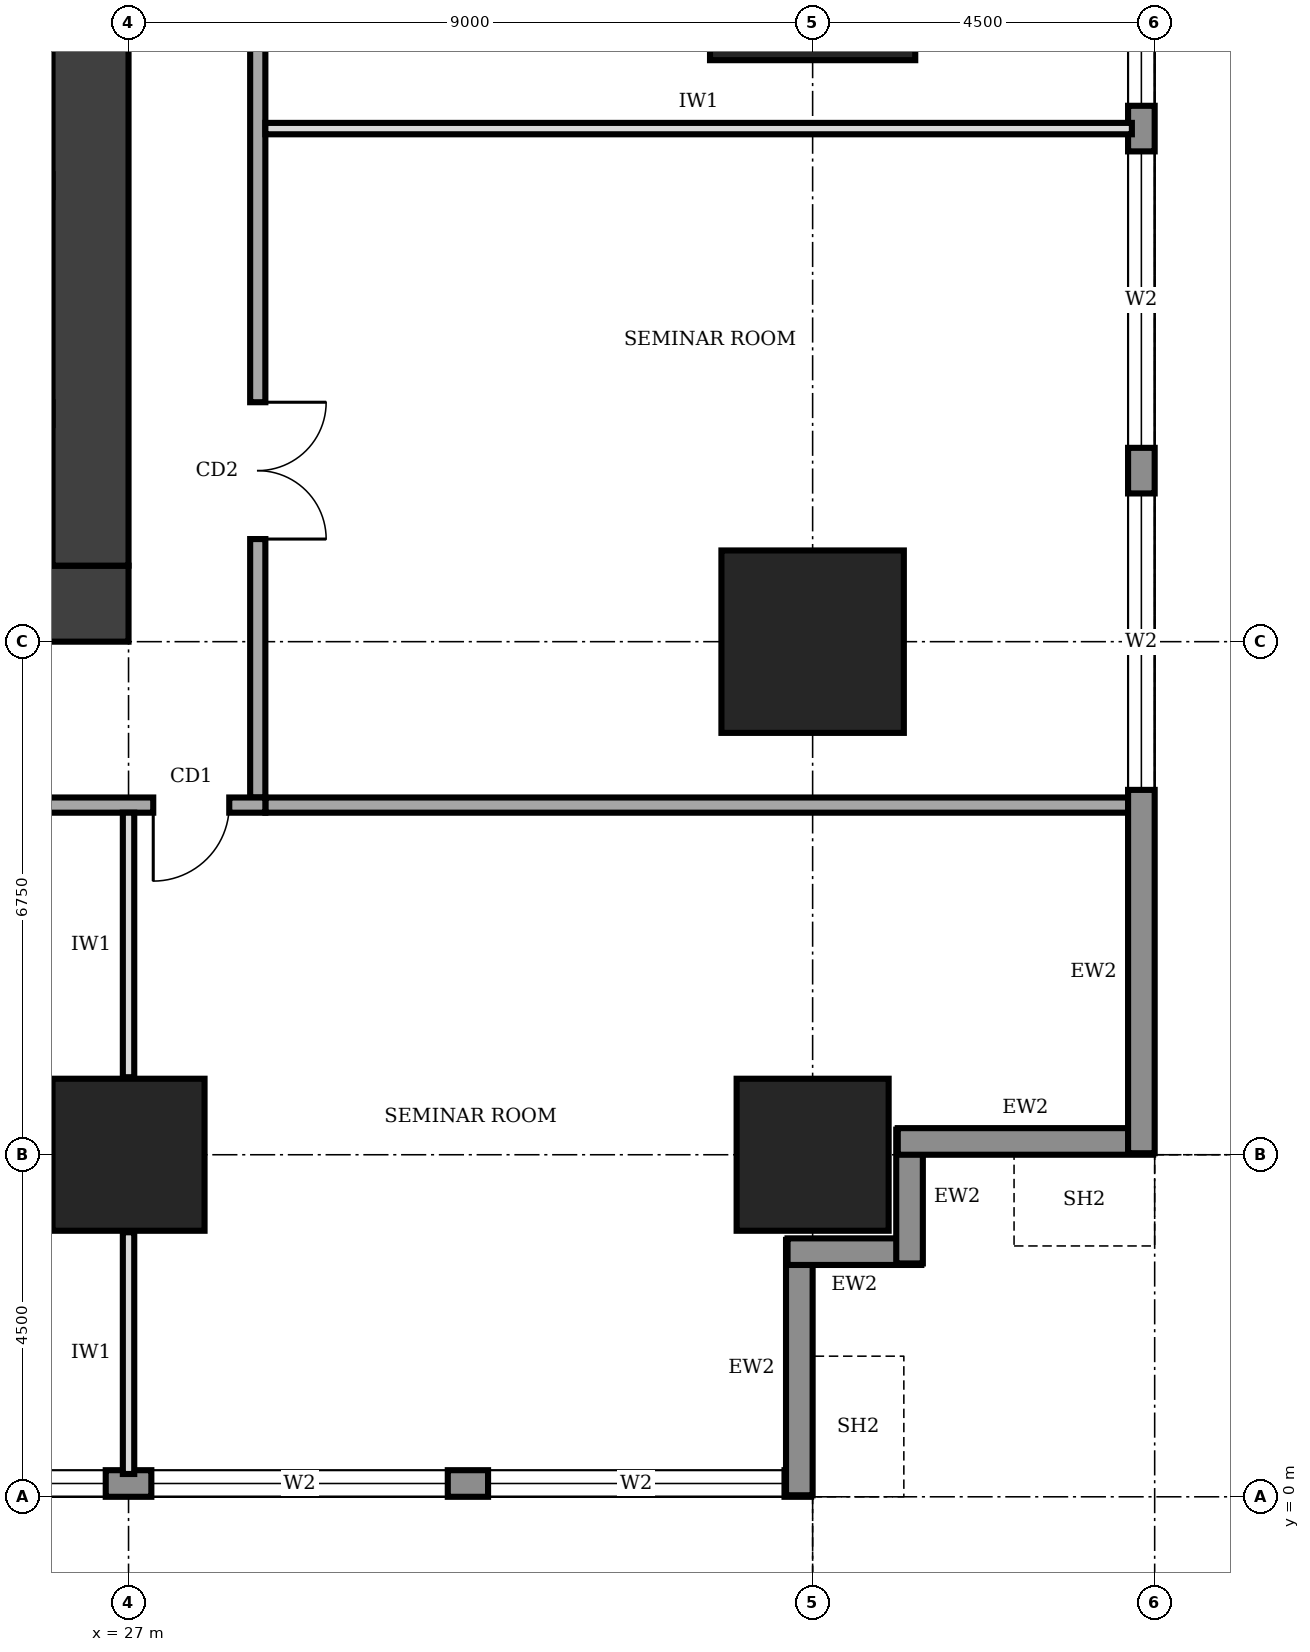
"""IFC4 building model, lengths in metres.
Left out: names, types, materials, properties, quantities, classifications, styles, units other than length and angle.
Written with IfcOpenShell. Run it as: python <this file> out.ifc"""

import sys

from ifc_helpers import new_model, si_unit, direction, frame, frame_2d, origin, origin_2d, place, context, subcontext, project, spatial, rectangle, extrude, element, fill, save


model = new_model("IFC4")
c1 = context("Model", 3, precision=1e-05, world=origin(), true_north=direction((0.0, 1.0)))
c2 = subcontext(c1, "Body", "Model", "MODEL_VIEW")
j1 = project(units=[si_unit("LENGTHUNIT", "METRE"), si_unit("PLANEANGLEUNIT", "RADIAN")], contexts=[c1])
p1 = place(None, origin())
s1 = spatial("IfcSite", under=j1, at=p1, CompositionType="ELEMENT")
p2 = place(p1, origin())
s2 = spatial("IfcBuilding", under=s1, at=p2, CompositionType="ELEMENT")
p3 = place(p2, frame((0.0, 0.0, 57.0)))
s3 = spatial("IfcBuildingStorey", under=s2, at=p3, CompositionType="ELEMENT", Elevation=57.0)
p4 = place(p3, frame((13.5, 11.75, 0.0), z_axis=(0.0, 0.0, 1.0), x_axis=(1.0, 0.0, 0.0)))
e1 = element("IfcWall", 1, at=p4, inside=s3, PredefinedType="SHEAR", context=c2, shape_type="SweptSolid", body=[
    extrude(rectangle(XDim=13.5, YDim=1.0, at=frame_2d((6.75, 0.0))), origin(), (0.0, 0.0, 1.0), 4.0),
])
p5 = place(p4, frame((4.75, 0.0, 0.0)))
e2 = element("IfcOpeningElement", 2, at=p5, cuts=e1, PredefinedType="OPENING", context=c2, shape_type="SweptSolid", body=[
    extrude(rectangle(XDim=1.0, YDim=2.1, at=frame_2d((0.5, 1.05))), frame((0.0, 0.51, 0.0), z_axis=(0.0, -1.0, 0.0), x_axis=(1.0, 0.0, 0.0)), (0.0, 0.0, 1.0), 1.02),
])
p6 = place(p3, frame((26.5, 12.25, 0.0), z_axis=(0.0, 0.0, 1.0), x_axis=(0.0, 1.0, 0.0)))
e3 = element("IfcWall", 3, at=p6, inside=s3, PredefinedType="SHEAR", context=c2, shape_type="SweptSolid", body=[
    extrude(rectangle(XDim=16.0, YDim=1.0, at=frame_2d((8.0, 0.0))), origin(), (0.0, 0.0, 1.0), 4.0),
])
for number, where, z_axis, x_axis in (
    (4, (27.0, 4.5, 0.0), (0.0, 0.0, 1.0), (1.0, 0.0, 0.0)),
    (5, (36.0, 4.5, 0.0), (0.0, 0.0, 1.0), (1.0, 0.0, 0.0)),
):
    element("IfcColumn", number, at=place(p3, frame(where, z_axis=z_axis, x_axis=x_axis)), inside=s3, PredefinedType="COLUMN", context=c2, shape_type="SweptSolid", body=[
        extrude(rectangle(XDim=2.0, YDim=2.0, at=origin_2d()), origin(), (0.0, 0.0, 1.0), 4.0),
    ])
p7 = place(p3, frame((36.0, 11.25, 0.0), z_axis=(0.0, 0.0, 1.0), x_axis=(1.0, 0.0, 0.0)))
e6 = element("IfcColumn", 6, at=p7, inside=s3, PredefinedType="COLUMN", context=c2, shape_type="SweptSolid", body=[
    extrude(rectangle(XDim=2.4, YDim=2.4, at=origin_2d()), origin(), (0.0, 0.0, 1.0), 4.0),
])
p8 = place(p3, frame((36.0, 20.25, 0.0), z_axis=(0.0, 0.0, 1.0), x_axis=(1.0, 0.0, 0.0)))
e7 = element("IfcColumn", 7, at=p8, inside=s3, PredefinedType="COLUMN", context=c2, shape_type="SweptSolid", body=[
    extrude(rectangle(XDim=2.7, YDim=2.7, at=origin_2d()), origin(), (0.0, 0.0, 1.0), 4.0),
])
p9 = place(p3, frame((4.52, 0.175, 0.0), z_axis=(0.0, 0.0, 1.0), x_axis=(1.0, 0.0, 0.0)))
e8 = element("IfcWall", 8, at=p9, inside=s3, PredefinedType="STANDARD", context=c2, shape_type="SweptSolid", body=[
    extrude(rectangle(XDim=31.46, YDim=0.35, at=frame_2d((15.73, 0.0))), origin(), (0.0, 0.0, 1.0), 3.75),
])
p10 = place(p9, frame((4.78, 0.0, 0.6)))
e9 = element("IfcOpeningElement", 9, at=p10, cuts=e8, PredefinedType="OPENING", context=c2, shape_type="SweptSolid", body=[
    extrude(rectangle(XDim=3.9, YDim=2.6, at=frame_2d((1.95, 1.3))), frame((0.0, 0.185, 0.0), z_axis=(0.0, -1.0, 0.0), x_axis=(1.0, 0.0, 0.0)), (0.0, 0.0, 1.0), 0.37),
])
p11 = place(p9, frame((9.28, 0.0, 0.6)))
e10 = element("IfcOpeningElement", 10, at=p11, cuts=e8, PredefinedType="OPENING", context=c2, shape_type="SweptSolid", body=[
    extrude(rectangle(XDim=3.9, YDim=2.6, at=frame_2d((1.95, 1.3))), frame((0.0, 0.185, 0.0), z_axis=(0.0, -1.0, 0.0), x_axis=(1.0, 0.0, 0.0)), (0.0, 0.0, 1.0), 0.37),
])
p12 = place(p9, frame((13.78, 0.0, 0.6)))
e11 = element("IfcOpeningElement", 11, at=p12, cuts=e8, PredefinedType="OPENING", context=c2, shape_type="SweptSolid", body=[
    extrude(rectangle(XDim=3.9, YDim=2.6, at=frame_2d((1.95, 1.3))), frame((0.0, 0.185, 0.0), z_axis=(0.0, -1.0, 0.0), x_axis=(1.0, 0.0, 0.0)), (0.0, 0.0, 1.0), 0.37),
])
p13 = place(p9, frame((18.28, 0.0, 0.6)))
e12 = element("IfcOpeningElement", 12, at=p13, cuts=e8, PredefinedType="OPENING", context=c2, shape_type="SweptSolid", body=[
    extrude(rectangle(XDim=3.9, YDim=2.6, at=frame_2d((1.95, 1.3))), frame((0.0, 0.185, 0.0), z_axis=(0.0, -1.0, 0.0), x_axis=(1.0, 0.0, 0.0)), (0.0, 0.0, 1.0), 0.37),
])
p14 = place(p9, frame((22.78, 0.0, 0.6)))
e13 = element("IfcOpeningElement", 13, at=p14, cuts=e8, PredefinedType="OPENING", context=c2, shape_type="SweptSolid", body=[
    extrude(rectangle(XDim=3.9, YDim=2.6, at=frame_2d((1.95, 1.3))), frame((0.0, 0.185, 0.0), z_axis=(0.0, -1.0, 0.0), x_axis=(1.0, 0.0, 0.0)), (0.0, 0.0, 1.0), 0.37),
])
p15 = place(p9, frame((27.21, 0.0, 0.6)))
e14 = element("IfcOpeningElement", 14, at=p15, cuts=e8, PredefinedType="OPENING", context=c2, shape_type="SweptSolid", body=[
    extrude(rectangle(XDim=3.9, YDim=2.6, at=frame_2d((1.95, 1.3))), frame((0.0, 0.185, 0.0), z_axis=(0.0, -1.0, 0.0), x_axis=(1.0, 0.0, 0.0)), (0.0, 0.0, 1.0), 0.37),
])
p16 = place(p3, frame((35.825, 0.02, 0.0), z_axis=(0.0, 0.0, 1.0), x_axis=(0.0, 1.0, 0.0)))
e15 = element("IfcWall", 15, at=p16, inside=s3, PredefinedType="STANDARD", context=c2, shape_type="SweptSolid", body=[
    extrude(rectangle(XDim=3.36, YDim=0.35, at=frame_2d((1.68, 0.0))), origin(), (0.0, 0.0, 1.0), 2.85),
])
for number, where, z_axis, x_axis in (
    (16, (35.67, 3.225, 0.0), (0.0, 0.0, 1.0), (1.0, 0.0, 0.0)),
    (17, (37.275, 3.07, 0.0), (0.0, 0.0, 1.0), (0.0, 1.0, 0.0)),
):
    element("IfcWall", number, at=place(p3, frame(where, z_axis=z_axis, x_axis=x_axis)), inside=s3, PredefinedType="STANDARD", context=c2, shape_type="SweptSolid", body=[
        extrude(rectangle(XDim=1.76, YDim=0.35, at=frame_2d((0.88, 0.0))), origin(), (0.0, 0.0, 1.0), 3.75),
    ])
p17 = place(p3, frame((37.12, 4.675, 0.0), z_axis=(0.0, 0.0, 1.0), x_axis=(1.0, 0.0, 0.0)))
e18 = element("IfcWall", 18, at=p17, inside=s3, PredefinedType="STANDARD", context=c2, shape_type="SweptSolid", body=[
    extrude(rectangle(XDim=3.36, YDim=0.35, at=frame_2d((1.68, 0.0))), origin(), (0.0, 0.0, 1.0), 2.85),
])
p18 = place(p3, frame((40.325, 4.52, 0.0), z_axis=(0.0, 0.0, 1.0), x_axis=(0.0, 1.0, 0.0)))
e19 = element("IfcWall", 19, at=p18, inside=s3, PredefinedType="STANDARD", context=c2, shape_type="SweptSolid", body=[
    extrude(rectangle(XDim=31.46, YDim=0.35, at=frame_2d((15.73, 0.0))), origin(), (0.0, 0.0, 1.0), 3.75),
])
p19 = place(p18, frame((4.78, 0.0, 0.6)))
e20 = element("IfcOpeningElement", 20, at=p19, cuts=e19, PredefinedType="OPENING", context=c2, shape_type="SweptSolid", body=[
    extrude(rectangle(XDim=3.9, YDim=2.6, at=frame_2d((1.95, 1.3))), frame((0.0, 0.185, 0.0), z_axis=(0.0, -1.0, 0.0), x_axis=(1.0, 0.0, 0.0)), (0.0, 0.0, 1.0), 0.37),
])
p20 = place(p18, frame((9.28, 0.0, 0.6)))
e21 = element("IfcOpeningElement", 21, at=p20, cuts=e19, PredefinedType="OPENING", context=c2, shape_type="SweptSolid", body=[
    extrude(rectangle(XDim=3.9, YDim=2.6, at=frame_2d((1.95, 1.3))), frame((0.0, 0.185, 0.0), z_axis=(0.0, -1.0, 0.0), x_axis=(1.0, 0.0, 0.0)), (0.0, 0.0, 1.0), 0.37),
])
p21 = place(p18, frame((13.78, 0.0, 0.6)))
e22 = element("IfcOpeningElement", 22, at=p21, cuts=e19, PredefinedType="OPENING", context=c2, shape_type="SweptSolid", body=[
    extrude(rectangle(XDim=3.9, YDim=2.6, at=frame_2d((1.95, 1.3))), frame((0.0, 0.185, 0.0), z_axis=(0.0, -1.0, 0.0), x_axis=(1.0, 0.0, 0.0)), (0.0, 0.0, 1.0), 0.37),
])
p22 = place(p18, frame((18.28, 0.0, 0.6)))
e23 = element("IfcOpeningElement", 23, at=p22, cuts=e19, PredefinedType="OPENING", context=c2, shape_type="SweptSolid", body=[
    extrude(rectangle(XDim=3.9, YDim=2.6, at=frame_2d((1.95, 1.3))), frame((0.0, 0.185, 0.0), z_axis=(0.0, -1.0, 0.0), x_axis=(1.0, 0.0, 0.0)), (0.0, 0.0, 1.0), 0.37),
])
p23 = place(p18, frame((22.78, 0.0, 0.6)))
e24 = element("IfcOpeningElement", 24, at=p23, cuts=e19, PredefinedType="OPENING", context=c2, shape_type="SweptSolid", body=[
    extrude(rectangle(XDim=3.9, YDim=2.6, at=frame_2d((1.95, 1.3))), frame((0.0, 0.185, 0.0), z_axis=(0.0, -1.0, 0.0), x_axis=(1.0, 0.0, 0.0)), (0.0, 0.0, 1.0), 0.37),
])
p24 = place(p18, frame((27.21, 0.0, 0.6)))
e25 = element("IfcOpeningElement", 25, at=p24, cuts=e19, PredefinedType="OPENING", context=c2, shape_type="SweptSolid", body=[
    extrude(rectangle(XDim=3.9, YDim=2.6, at=frame_2d((1.95, 1.3))), frame((0.0, 0.185, 0.0), z_axis=(0.0, -1.0, 0.0), x_axis=(1.0, 0.0, 0.0)), (0.0, 0.0, 1.0), 0.37),
])
p25 = place(p3, frame((11.9, 9.1, 0.0), z_axis=(0.0, 0.0, 1.0), x_axis=(1.0, 0.0, 0.0)))
e26 = element("IfcWall", 26, at=p25, inside=s3, PredefinedType="SOLIDWALL", context=c2, shape_type="SweptSolid", body=[
    extrude(rectangle(XDim=16.9, YDim=0.2, at=frame_2d((8.45, 0.0))), origin(), (0.0, 0.0, 1.0), 3.75),
])
p26 = place(p25, frame((0.275, 0.0, 0.0)))
e27 = element("IfcOpeningElement", 27, at=p26, cuts=e26, PredefinedType="OPENING", context=c2, shape_type="SweptSolid", body=[
    extrude(rectangle(XDim=1.0, YDim=2.1, at=frame_2d((0.5, 1.05))), frame((0.0, 0.11, 0.0), z_axis=(0.0, -1.0, 0.0), x_axis=(1.0, 0.0, 0.0)), (0.0, 0.0, 1.0), 0.22),
])
p27 = place(p25, frame((7.45, 0.0, 0.0)))
e28 = element("IfcOpeningElement", 28, at=p27, cuts=e26, PredefinedType="OPENING", context=c2, shape_type="SweptSolid", body=[
    extrude(rectangle(XDim=1.8, YDim=2.1, at=frame_2d((0.9, 1.05))), frame((0.0, 0.11, 0.0), z_axis=(0.0, -1.0, 0.0), x_axis=(1.0, 0.0, 0.0)), (0.0, 0.0, 1.0), 0.22),
])
p28 = place(p25, frame((15.425, 0.0, 0.0)))
e29 = element("IfcOpeningElement", 29, at=p28, cuts=e26, PredefinedType="OPENING", context=c2, shape_type="SweptSolid", body=[
    extrude(rectangle(XDim=1.0, YDim=2.1, at=frame_2d((0.5, 1.05))), frame((0.0, 0.11, 0.0), z_axis=(0.0, -1.0, 0.0), x_axis=(1.0, 0.0, 0.0)), (0.0, 0.0, 1.0), 0.22),
])
p29 = place(p3, frame((28.7, 9.2, 0.0), z_axis=(0.0, 0.0, 1.0), x_axis=(0.0, 1.0, 0.0)))
e30 = element("IfcWall", 30, at=p29, inside=s3, PredefinedType="SOLIDWALL", context=c2, shape_type="SweptSolid", body=[
    extrude(rectangle(XDim=23.8, YDim=0.2, at=frame_2d((11.9, 0.0))), origin(), (0.0, 0.0, 1.0), 3.75),
])
p30 = place(p29, frame((3.4, 0.0, 0.0)))
e31 = element("IfcOpeningElement", 31, at=p30, cuts=e30, PredefinedType="OPENING", context=c2, shape_type="SweptSolid", body=[
    extrude(rectangle(XDim=1.8, YDim=2.1, at=frame_2d((0.9, 1.05))), frame((0.0, 0.11, 0.0), z_axis=(0.0, -1.0, 0.0), x_axis=(1.0, 0.0, 0.0)), (0.0, 0.0, 1.0), 0.22),
])
p31 = place(p29, frame((10.55, 0.0, 0.0)))
e32 = element("IfcOpeningElement", 32, at=p31, cuts=e30, PredefinedType="OPENING", context=c2, shape_type="SweptSolid", body=[
    extrude(rectangle(XDim=1.0, YDim=2.1, at=frame_2d((0.5, 1.05))), frame((0.0, 0.11, 0.0), z_axis=(0.0, -1.0, 0.0), x_axis=(1.0, 0.0, 0.0)), (0.0, 0.0, 1.0), 0.22),
])
p32 = place(p29, frame((17.65, 0.0, 0.0)))
e33 = element("IfcOpeningElement", 33, at=p32, cuts=e30, PredefinedType="OPENING", context=c2, shape_type="SweptSolid", body=[
    extrude(rectangle(XDim=1.8, YDim=2.1, at=frame_2d((0.9, 1.05))), frame((0.0, 0.11, 0.0), z_axis=(0.0, -1.0, 0.0), x_axis=(1.0, 0.0, 0.0)), (0.0, 0.0, 1.0), 0.22),
])
p33 = place(p3, frame((28.8, 9.1, 0.0), z_axis=(0.0, 0.0, 1.0), x_axis=(1.0, 0.0, 0.0)))
e34 = element("IfcWall", 34, at=p33, inside=s3, PredefinedType="SOLIDWALL", context=c2, shape_type="SweptSolid", body=[
    extrude(rectangle(XDim=11.4, YDim=0.2, at=frame_2d((5.7, 0.0))), origin(), (0.0, 0.0, 1.0), 3.75),
])
p34 = place(p3, frame((27.0, 0.3, 0.0), z_axis=(0.0, 0.0, 1.0), x_axis=(0.0, 1.0, 0.0)))
e35 = element("IfcWall", 35, at=p34, inside=s3, PredefinedType="PARTITIONING", context=c2, shape_type="SweptSolid", body=[
    extrude(rectangle(XDim=3.18, YDim=0.15, at=frame_2d((1.59, 0.0))), origin(), (0.0, 0.0, 1.0), 2.85),
])
p35 = place(p3, frame((27.0, 5.52, 0.0), z_axis=(0.0, 0.0, 1.0), x_axis=(0.0, 1.0, 0.0)))
e36 = element("IfcWall", 36, at=p35, inside=s3, PredefinedType="PARTITIONING", context=c2, shape_type="SweptSolid", body=[
    extrude(rectangle(XDim=3.48, YDim=0.15, at=frame_2d((1.74, 0.0))), origin(), (0.0, 0.0, 1.0), 2.85),
])
p36 = place(p3, frame((28.8, 18.0, 0.0), z_axis=(0.0, 0.0, 1.0), x_axis=(1.0, 0.0, 0.0)))
e37 = element("IfcWall", 37, at=p36, inside=s3, PredefinedType="PARTITIONING", context=c2, shape_type="SweptSolid", body=[
    extrude(rectangle(XDim=11.4, YDim=0.15, at=frame_2d((5.7, 0.0))), origin(), (0.0, 0.0, 1.0), 3.75),
])
p37 = place(p13, origin())
e38 = element("IfcWindow", 38, at=p37, inside=s3, PartitioningType="SINGLE_PANEL", PredefinedType="WINDOW", context=c2, shape_type="SweptSolid", body=[
    extrude(rectangle(XDim=3.9, YDim=2.6, at=frame_2d((1.95, 1.3))), frame((0.0, 0.03, 0.0), z_axis=(0.0, -1.0, 0.0), x_axis=(1.0, 0.0, 0.0)), (0.0, 0.0, 1.0), 0.06),
])
fill(e12, e38)
p38 = place(p14, origin())
e39 = element("IfcWindow", 39, at=p38, inside=s3, PartitioningType="SINGLE_PANEL", PredefinedType="WINDOW", context=c2, shape_type="SweptSolid", body=[
    extrude(rectangle(XDim=3.9, YDim=2.6, at=frame_2d((1.95, 1.3))), frame((0.0, 0.03, 0.0), z_axis=(0.0, -1.0, 0.0), x_axis=(1.0, 0.0, 0.0)), (0.0, 0.0, 1.0), 0.06),
])
fill(e13, e39)
p39 = place(p15, origin())
e40 = element("IfcWindow", 40, at=p39, inside=s3, PartitioningType="SINGLE_PANEL", PredefinedType="WINDOW", context=c2, shape_type="SweptSolid", body=[
    extrude(rectangle(XDim=3.9, YDim=2.6, at=frame_2d((1.95, 1.3))), frame((0.0, 0.03, 0.0), z_axis=(0.0, -1.0, 0.0), x_axis=(1.0, 0.0, 0.0)), (0.0, 0.0, 1.0), 0.06),
])
fill(e14, e40)
p40 = place(p19, origin())
e41 = element("IfcWindow", 41, at=p40, inside=s3, PartitioningType="SINGLE_PANEL", PredefinedType="WINDOW", context=c2, shape_type="SweptSolid", body=[
    extrude(rectangle(XDim=3.9, YDim=2.6, at=frame_2d((1.95, 1.3))), frame((0.0, 0.03, 0.0), z_axis=(0.0, -1.0, 0.0), x_axis=(1.0, 0.0, 0.0)), (0.0, 0.0, 1.0), 0.06),
])
fill(e20, e41)
p41 = place(p20, origin())
e42 = element("IfcWindow", 42, at=p41, inside=s3, PartitioningType="SINGLE_PANEL", PredefinedType="WINDOW", context=c2, shape_type="SweptSolid", body=[
    extrude(rectangle(XDim=3.9, YDim=2.6, at=frame_2d((1.95, 1.3))), frame((0.0, 0.03, 0.0), z_axis=(0.0, -1.0, 0.0), x_axis=(1.0, 0.0, 0.0)), (0.0, 0.0, 1.0), 0.06),
])
fill(e21, e42)
p42 = place(p21, origin())
e43 = element("IfcWindow", 43, at=p42, inside=s3, PartitioningType="SINGLE_PANEL", PredefinedType="WINDOW", context=c2, shape_type="SweptSolid", body=[
    extrude(rectangle(XDim=3.9, YDim=2.6, at=frame_2d((1.95, 1.3))), frame((0.0, 0.03, 0.0), z_axis=(0.0, -1.0, 0.0), x_axis=(1.0, 0.0, 0.0)), (0.0, 0.0, 1.0), 0.06),
])
fill(e22, e43)
p43 = place(p28, frame((1.0, 0.0, 0.0), z_axis=(0.0, 0.0, 1.0), x_axis=(-1.0, 0.0, 0.0)))
e44 = element("IfcDoor", 44, at=p43, inside=s3, OperationType="SINGLE_SWING_RIGHT", PredefinedType="DOOR", context=c2, shape_type="SweptSolid", body=[
    extrude(rectangle(XDim=1.0, YDim=2.1, at=frame_2d((0.5, 1.05))), frame((0.0, 0.025, 0.0), z_axis=(0.0, -1.0, 0.0), x_axis=(1.0, 0.0, 0.0)), (0.0, 0.0, 1.0), 0.05),
])
fill(e29, e44)
p44 = place(p30, frame((1.8, 0.0, 0.0), z_axis=(0.0, 0.0, 1.0), x_axis=(-1.0, 0.0, 0.0)))
e45 = element("IfcDoor", 45, at=p44, inside=s3, OperationType="DOUBLE_DOOR_SINGLE_SWING", PredefinedType="DOOR", context=c2, shape_type="SweptSolid", body=[
    extrude(rectangle(XDim=1.8, YDim=2.1, at=frame_2d((0.9, 1.05))), frame((0.0, 0.025, 0.0), z_axis=(0.0, -1.0, 0.0), x_axis=(1.0, 0.0, 0.0)), (0.0, 0.0, 1.0), 0.05),
])
fill(e31, e45)
save(model, sys.argv[1])
